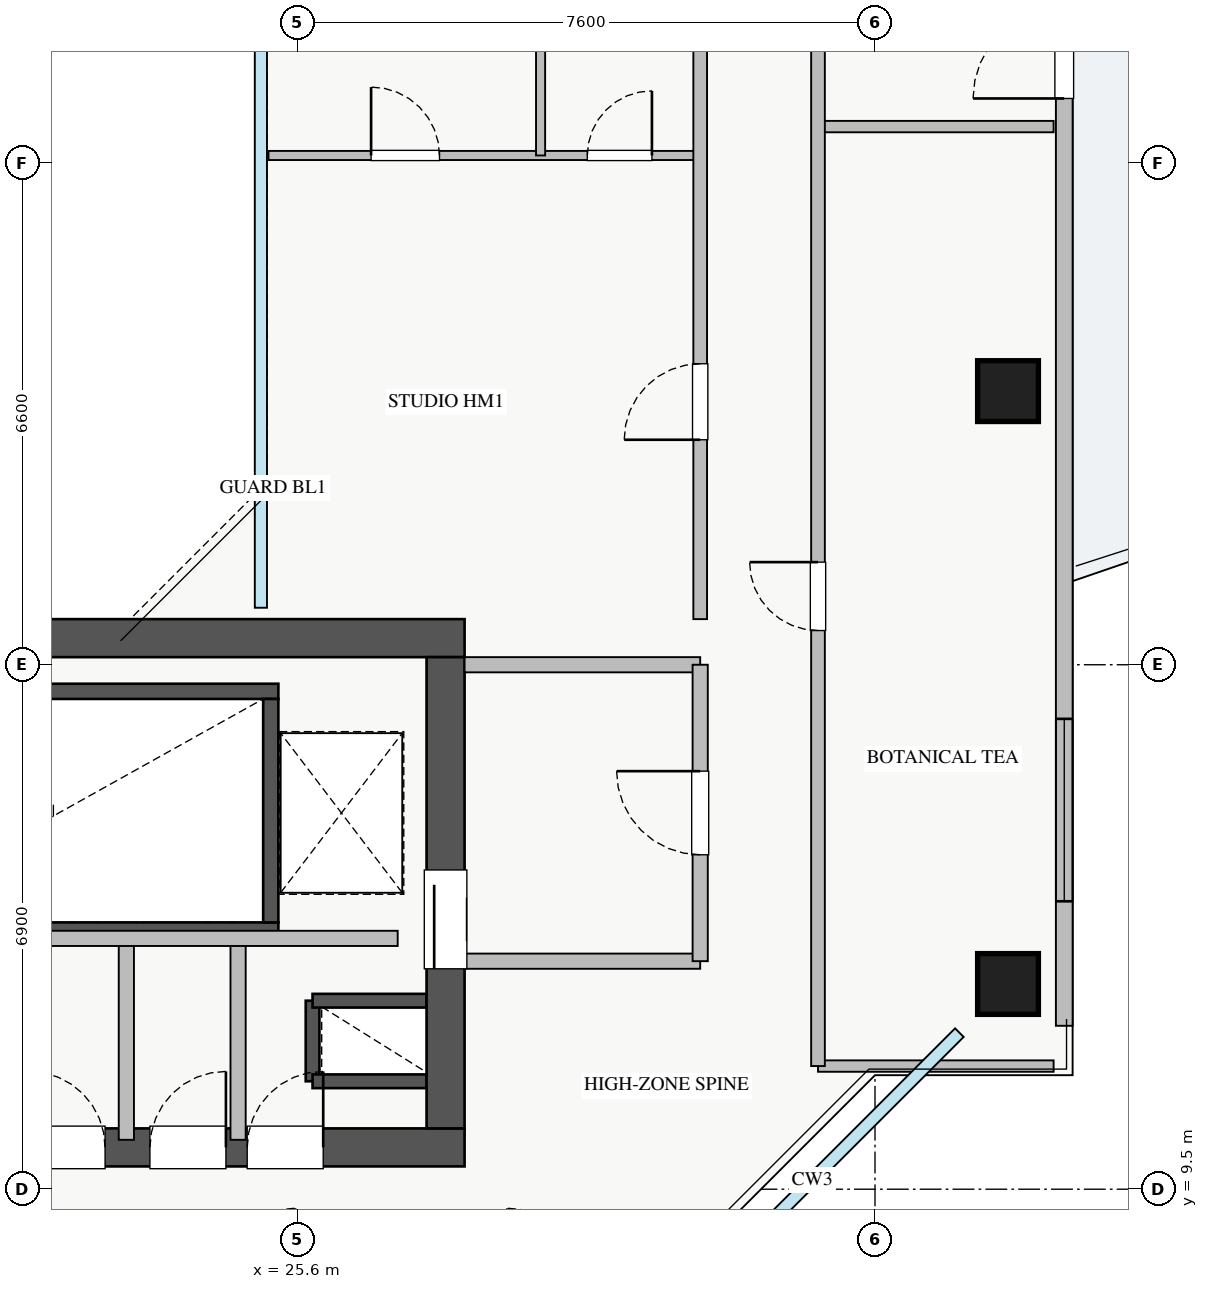
"""IFC4 building model, lengths in metres.
Left out: names, types, materials, properties, quantities, classifications, styles, units other than length and angle.
Written with IfcOpenShell. Run it as: python <this file> out.ifc"""

import sys

from ifc_helpers import new_model, si_unit, direction, frame, frame_2d, origin, origin_2d, place, context, subcontext, project, spatial, rectangle, extrude, source, transform, mapped, element, fill, save


model = new_model("IFC4")
c1 = context("Model", 3, precision=1e-05, world=origin(), true_north=direction((0.0, 1.0)))
c2 = subcontext(c1, "Body", "Model", "MODEL_VIEW")
j1 = project(units=[si_unit("LENGTHUNIT", "METRE"), si_unit("PLANEANGLEUNIT", "RADIAN")], contexts=[c1])
p1 = place(None, origin())
s1 = spatial("IfcSite", under=j1, at=p1, CompositionType="ELEMENT")
p2 = place(p1, origin())
s2 = spatial("IfcBuilding", under=s1, at=p2, CompositionType="ELEMENT")
p3 = place(p2, frame((0.0, 0.0, 193.75)))
s3 = spatial("IfcBuildingStorey", under=s2, at=p3, CompositionType="ELEMENT", Elevation=193.75)
p4 = place(p3, frame((25.8, 10.92, 0.0), z_axis=(0.0, 0.0, 1.0), x_axis=(0.0, 1.0, 0.0)))
e1 = element("IfcWall", 1, at=p4, inside=s3, PredefinedType="SHEAR", context=c2, shape_type="SweptSolid", body=[
    extrude(rectangle(XDim=1.06, YDim=0.18, at=frame_2d((0.53, 0.0))), origin(), (0.0, 0.0, 1.0), 3.07),
])
for number, where, z_axis, x_axis in (
    (2, (25.8, 11.98, 0.0), (0.0, 0.0, 1.0), (1.0, 0.0, 0.0)),
    (3, (25.8, 10.92, 0.0), (0.0, 0.0, 1.0), (1.0, 0.0, 0.0)),
):
    element("IfcWall", number, at=place(p3, frame(where, z_axis=z_axis, x_axis=x_axis)), inside=s3, PredefinedType="SHEAR", context=c2, shape_type="SweptSolid", body=[
        extrude(rectangle(XDim=1.5, YDim=0.18, at=frame_2d((0.75, 0.0))), origin(), (0.0, 0.0, 1.0), 3.07),
    ])
p5 = place(p3, frame((18.2, 12.91, 0.0), z_axis=(0.0, 0.0, 1.0), x_axis=(1.0, 0.0, 0.0)))
e4 = element("IfcWall", 4, at=p5, inside=s3, PredefinedType="SHEAR", context=c2, shape_type="SweptSolid", body=[
    extrude(rectangle(XDim=7.15, YDim=0.2, at=frame_2d((3.575, 0.0))), origin(), (0.0, 0.0, 1.0), 3.25),
])
p6 = place(p5, frame((0.35, 0.0, 0.0)))
e5 = element("IfcOpeningElement", 5, at=p6, cuts=e4, PredefinedType="OPENING", context=c2, shape_type="SweptSolid", body=[
    extrude(rectangle(XDim=1.1, YDim=2.05, at=frame_2d((0.55, 1.025))), frame((0.0, 0.11, 0.0), z_axis=(0.0, -1.0, 0.0), x_axis=(1.0, 0.0, 0.0)), (0.0, 0.0, 1.0), 0.22),
])
p7 = place(p3, frame((18.2, 16.05, 0.0), z_axis=(0.0, 0.0, 1.0), x_axis=(1.0, 0.0, 0.0)))
e6 = element("IfcWall", 6, at=p7, inside=s3, PredefinedType="SHEAR", context=c2, shape_type="SweptSolid", body=[
    extrude(rectangle(XDim=7.15, YDim=0.2, at=frame_2d((3.575, 0.0))), origin(), (0.0, 0.0, 1.0), 3.25),
])
p8 = place(p3, frame((25.25, 13.01, 0.0), z_axis=(0.0, 0.0, 1.0), x_axis=(0.0, 1.0, 0.0)))
e7 = element("IfcWall", 7, at=p8, inside=s3, PredefinedType="SHEAR", context=c2, shape_type="SweptSolid", body=[
    extrude(rectangle(XDim=2.94, YDim=0.2, at=frame_2d((1.47, 0.0))), origin(), (0.0, 0.0, 1.0), 3.25),
])
p9 = place(p3, frame((10.2, 10.05, 0.0), z_axis=(0.0, 0.0, 1.0), x_axis=(1.0, 0.0, 0.0)))
e8 = element("IfcWall", 8, at=p9, inside=s3, PredefinedType="SHEAR", context=c2, shape_type="SweptSolid", body=[
    extrude(rectangle(XDim=17.6, YDim=0.5, at=frame_2d((8.8, 0.0))), origin(), (0.0, 0.0, 1.0), 3.25),
])
p10 = place(p9, frame((1.15, 0.0, 0.0)))
e9 = element("IfcOpeningElement", 9, at=p10, cuts=e8, PredefinedType="OPENING", context=c2, shape_type="SweptSolid", body=[
    extrude(rectangle(XDim=1.1, YDim=2.05, at=frame_2d((0.55, 1.025))), frame((0.0, 0.26, 0.0), z_axis=(0.0, -1.0, 0.0), x_axis=(1.0, 0.0, 0.0)), (0.0, 0.0, 1.0), 0.52),
])
p11 = place(p9, frame((8.3, 0.0, 0.0)))
e10 = element("IfcOpeningElement", 10, at=p11, cuts=e8, PredefinedType="OPENING", context=c2, shape_type="SweptSolid", body=[
    extrude(rectangle(XDim=1.1, YDim=2.05, at=frame_2d((0.55, 1.025))), frame((0.0, 0.26, 0.0), z_axis=(0.0, -1.0, 0.0), x_axis=(1.0, 0.0, 0.0)), (0.0, 0.0, 1.0), 0.52),
])
p12 = place(p9, frame((2.85, 0.0, 0.0)))
e11 = element("IfcOpeningElement", 11, at=p12, cuts=e8, PredefinedType="OPENING", context=c2, shape_type="SweptSolid", body=[
    extrude(rectangle(XDim=1.1, YDim=2.05, at=frame_2d((0.55, 1.025))), frame((0.0, 0.26, 0.0), z_axis=(0.0, -1.0, 0.0), x_axis=(1.0, 0.0, 0.0)), (0.0, 0.0, 1.0), 0.52),
])
p13 = place(p9, frame((5.8, 0.0, 0.0)))
e12 = element("IfcOpeningElement", 12, at=p13, cuts=e8, PredefinedType="OPENING", context=c2, shape_type="SweptSolid", body=[
    extrude(rectangle(XDim=1.0, YDim=2.05, at=frame_2d((0.5, 1.025))), frame((0.0, 0.26, 0.0), z_axis=(0.0, -1.0, 0.0), x_axis=(1.0, 0.0, 0.0)), (0.0, 0.0, 1.0), 0.52),
])
p14 = place(p9, frame((14.74, 0.0, 0.0)))
e13 = element("IfcOpeningElement", 13, at=p14, cuts=e8, PredefinedType="OPENING", context=c2, shape_type="SweptSolid", body=[
    extrude(rectangle(XDim=1.0, YDim=2.05, at=frame_2d((0.5, 1.025))), frame((0.0, 0.26, 0.0), z_axis=(0.0, -1.0, 0.0), x_axis=(1.0, 0.0, 0.0)), (0.0, 0.0, 1.0), 0.52),
])
p15 = place(p9, frame((10.155, 0.0, 0.0)))
e14 = element("IfcOpeningElement", 14, at=p15, cuts=e8, PredefinedType="OPENING", context=c2, shape_type="SweptSolid", body=[
    extrude(rectangle(XDim=1.0, YDim=2.05, at=frame_2d((0.5, 1.025))), frame((0.0, 0.26, 0.0), z_axis=(0.0, -1.0, 0.0), x_axis=(1.0, 0.0, 0.0)), (0.0, 0.0, 1.0), 0.52),
])
p16 = place(p9, frame((11.87, 0.0, 0.0)))
e15 = element("IfcOpeningElement", 15, at=p16, cuts=e8, PredefinedType="OPENING", context=c2, shape_type="SweptSolid", body=[
    extrude(rectangle(XDim=1.0, YDim=2.05, at=frame_2d((0.5, 1.025))), frame((0.0, 0.26, 0.0), z_axis=(0.0, -1.0, 0.0), x_axis=(1.0, 0.0, 0.0)), (0.0, 0.0, 1.0), 0.52),
])
p17 = place(p9, frame((13.46, 0.0, 0.0)))
e16 = element("IfcOpeningElement", 16, at=p17, cuts=e8, PredefinedType="OPENING", context=c2, shape_type="SweptSolid", body=[
    extrude(rectangle(XDim=1.0, YDim=2.05, at=frame_2d((0.5, 1.025))), frame((0.0, 0.26, 0.0), z_axis=(0.0, -1.0, 0.0), x_axis=(1.0, 0.0, 0.0)), (0.0, 0.0, 1.0), 0.52),
])
p18 = place(p3, frame((10.2, 16.75, 0.0), z_axis=(0.0, 0.0, 1.0), x_axis=(1.0, 0.0, 0.0)))
e17 = element("IfcWall", 17, at=p18, inside=s3, PredefinedType="SHEAR", context=c2, shape_type="SweptSolid", body=[
    extrude(rectangle(XDim=17.6, YDim=0.5, at=frame_2d((8.8, 0.0))), origin(), (0.0, 0.0, 1.0), 3.25),
])
p19 = place(p3, frame((27.55, 10.3, 0.0), z_axis=(0.0, 0.0, 1.0), x_axis=(0.0, 1.0, 0.0)))
e18 = element("IfcWall", 18, at=p19, inside=s3, PredefinedType="SHEAR", context=c2, shape_type="SweptSolid", body=[
    extrude(rectangle(XDim=6.2, YDim=0.5, at=frame_2d((3.1, 0.0))), origin(), (0.0, 0.0, 1.0), 3.25),
])
p20 = place(p19, frame((2.1, 0.0, 0.0)))
e19 = element("IfcOpeningElement", 19, at=p20, cuts=e18, PredefinedType="OPENING", context=c2, shape_type="SweptSolid", body=[
    extrude(rectangle(XDim=1.3, YDim=2.05, at=frame_2d((0.65, 1.025))), frame((0.0, 0.26, 0.0), z_axis=(0.0, -1.0, 0.0), x_axis=(1.0, 0.0, 0.0)), (0.0, 0.0, 1.0), 0.52),
])
m1 = source(origin(), c2, "Body", "SweptSolid", [
    extrude(rectangle(XDim=0.8, YDim=0.8, at=origin_2d()), origin(), (0.0, 0.0, 1.0), 3.25),
])
for number, where, z_axis, x_axis in (
    (20, (34.95, 12.2, 0.0), (0.0, 0.0, 1.0), (1.0, 0.0, 0.0)),
    (21, (34.95, 20.0, 0.0), (0.0, 0.0, 1.0), (1.0, 0.0, 0.0)),
):
    element("IfcColumn", number, at=place(p3, frame(where, z_axis=z_axis, x_axis=x_axis)), inside=s3, PredefinedType="COLUMN", context=c2, shape_type="MappedRepresentation", body=[
        mapped(m1, transform((0.0, 0.0, 0.0), x_axis=(1.0, 0.0, 0.0), y_axis=(0.0, 1.0, 0.0), z_axis=(0.0, 0.0, 1.0), scale=1.0)),
    ])
p21 = place(p3, frame((35.69, 11.65, 0.0), z_axis=(0.0, 0.0, 1.0), x_axis=(0.0, 1.0, 0.0)))
e22 = element("IfcWall", 22, at=p21, inside=s3, PredefinedType="STANDARD", context=c2, shape_type="SweptSolid", body=[
    extrude(rectangle(XDim=22.7, YDim=0.22, at=frame_2d((11.35, 0.0))), origin(), (0.0, 0.0, 1.0), 2.61),
])
p22 = place(p21, frame((12.2, 0.0, 0.0)))
e23 = element("IfcOpeningElement", 23, at=p22, cuts=e22, PredefinedType="OPENING", context=c2, shape_type="SweptSolid", body=[
    extrude(rectangle(XDim=1.2, YDim=2.1, at=frame_2d((0.6, 1.05))), frame((0.0, 0.12, 0.0), z_axis=(0.0, -1.0, 0.0), x_axis=(1.0, 0.0, 0.0)), (0.0, 0.0, 1.0), 0.24),
])
p23 = place(p21, frame((1.638, 0.0, 0.9)))
e24 = element("IfcOpeningElement", 24, at=p23, cuts=e22, PredefinedType="OPENING", context=c2, shape_type="SweptSolid", body=[
    extrude(rectangle(XDim=2.4, YDim=1.48, at=frame_2d((1.2, 0.74))), frame((0.0, 0.12, 0.0), z_axis=(0.0, -1.0, 0.0), x_axis=(1.0, 0.0, 0.0)), (0.0, 0.0, 1.0), 0.24),
])
p24 = place(p21, frame((18.813, 0.0, 0.9)))
e25 = element("IfcOpeningElement", 25, at=p24, cuts=e22, PredefinedType="OPENING", context=c2, shape_type="SweptSolid", body=[
    extrude(rectangle(XDim=2.1, YDim=1.48, at=frame_2d((1.05, 0.74))), frame((0.0, 0.12, 0.0), z_axis=(0.0, -1.0, 0.0), x_axis=(1.0, 0.0, 0.0)), (0.0, 0.0, 1.0), 0.24),
])
p25 = place(p3, frame((27.8, 16.4, 0.0), z_axis=(0.0, 0.0, 1.0), x_axis=(1.0, 0.0, 0.0)))
e26 = element("IfcWall", 26, at=p25, inside=s3, PredefinedType="PARTITIONING", context=c2, shape_type="SweptSolid", body=[
    extrude(rectangle(XDim=3.1, YDim=0.2, at=frame_2d((1.55, 0.0))), origin(), (0.0, 0.0, 1.0), 3.07),
])
p26 = place(p3, frame((27.8, 12.5, 0.0), z_axis=(0.0, 0.0, 1.0), x_axis=(1.0, 0.0, 0.0)))
e27 = element("IfcWall", 27, at=p26, inside=s3, PredefinedType="PARTITIONING", context=c2, shape_type="SweptSolid", body=[
    extrude(rectangle(XDim=3.1, YDim=0.2, at=frame_2d((1.55, 0.0))), origin(), (0.0, 0.0, 1.0), 2.265),
])
p27 = place(p3, frame((30.9, 12.5, 0.0), z_axis=(0.0, 0.0, 1.0), x_axis=(0.0, 1.0, 0.0)))
e28 = element("IfcWall", 28, at=p27, inside=s3, PredefinedType="PARTITIONING", context=c2, shape_type="SweptSolid", body=[
    extrude(rectangle(XDim=3.9, YDim=0.2, at=frame_2d((1.95, 0.0))), origin(), (0.0, 0.0, 1.0), 3.07),
])
p28 = place(p27, frame((1.4, 0.0, 0.0)))
e29 = element("IfcOpeningElement", 29, at=p28, cuts=e28, PredefinedType="OPENING", context=c2, shape_type="SweptSolid", body=[
    extrude(rectangle(XDim=1.1, YDim=2.05, at=frame_2d((0.55, 1.025))), frame((0.0, 0.11, 0.0), z_axis=(0.0, -1.0, 0.0), x_axis=(1.0, 0.0, 0.0)), (0.0, 0.0, 1.0), 0.22),
])
for number, where, z_axis, x_axis in (
    (30, (24.82, 10.15, 0.0), (0.0, 0.0, 1.0), (0.0, 1.0, 0.0)),
    (31, (23.35, 10.15, 0.0), (0.0, 0.0, 1.0), (0.0, 1.0, 0.0)),
):
    element("IfcWall", number, at=place(p3, frame(where, z_axis=z_axis, x_axis=x_axis)), inside=s3, PredefinedType="PARTITIONING", context=c2, shape_type="SweptSolid", body=[
        extrude(rectangle(XDim=2.65, YDim=0.2, at=frame_2d((1.325, 0.0))), origin(), (0.0, 0.0, 1.0), 3.07),
    ])
p29 = place(p3, frame((21.75, 12.8, 0.0), z_axis=(0.0, 0.0, 1.0), x_axis=(1.0, 0.0, 0.0)))
e32 = element("IfcWall", 32, at=p29, inside=s3, PredefinedType="PARTITIONING", context=c2, shape_type="SweptSolid", body=[
    extrude(rectangle(XDim=5.17, YDim=0.2, at=frame_2d((2.585, 0.0))), origin(), (0.0, 0.0, 1.0), 3.07),
])
p30 = place(p3, frame((25.22, 23.1, 0.0), z_axis=(0.0, 0.0, 1.0), x_axis=(1.0, 0.0, 0.0)))
e33 = element("IfcWall", 33, at=p30, inside=s3, PredefinedType="PLUMBINGWALL", context=c2, shape_type="SweptSolid", body=[
    extrude(rectangle(XDim=5.68, YDim=0.12, at=frame_2d((2.84, 0.0))), origin(), (0.0, 0.0, 1.0), 3.07),
])
p31 = place(p30, frame((1.35, 0.0, 0.0)))
e34 = element("IfcOpeningElement", 34, at=p31, cuts=e33, PredefinedType="OPENING", context=c2, shape_type="SweptSolid", body=[
    extrude(rectangle(XDim=0.9, YDim=2.05, at=frame_2d((0.45, 1.025))), frame((0.0, 0.07, 0.0), z_axis=(0.0, -1.0, 0.0), x_axis=(1.0, 0.0, 0.0)), (0.0, 0.0, 1.0), 0.14),
])
p32 = place(p30, frame((4.195, 0.0, 0.0)))
e35 = element("IfcOpeningElement", 35, at=p32, cuts=e33, PredefinedType="OPENING", context=c2, shape_type="SweptSolid", body=[
    extrude(rectangle(XDim=0.85, YDim=2.05, at=frame_2d((0.425, 1.025))), frame((0.0, 0.07, 0.0), z_axis=(0.0, -1.0, 0.0), x_axis=(1.0, 0.0, 0.0)), (0.0, 0.0, 1.0), 0.14),
])
p33 = place(p3, frame((28.8, 23.1, 0.0), z_axis=(0.0, 0.0, 1.0), x_axis=(0.0, 1.0, 0.0)))
e36 = element("IfcWall", 36, at=p33, inside=s3, PredefinedType="PLUMBINGWALL", context=c2, shape_type="SweptSolid", body=[
    extrude(rectangle(XDim=5.9, YDim=0.12, at=frame_2d((2.95, 0.0))), origin(), (0.0, 0.0, 1.0), 3.07),
])
p34 = place(p3, frame((30.9, 17.0, 0.0), z_axis=(0.0, 0.0, 1.0), x_axis=(0.0, 1.0, 0.0)))
e37 = element("IfcWall", 37, at=p34, inside=s3, PredefinedType="PARTITIONING", context=c2, shape_type="SweptSolid", body=[
    extrude(rectangle(XDim=12.0, YDim=0.18, at=frame_2d((6.0, 0.0))), origin(), (0.0, 0.0, 1.0), 3.07),
])
p35 = place(p34, frame((2.36, 0.0, 0.0)))
e38 = element("IfcOpeningElement", 38, at=p35, cuts=e37, PredefinedType="OPENING", context=c2, shape_type="SweptSolid", body=[
    extrude(rectangle(XDim=1.0, YDim=2.05, at=frame_2d((0.5, 1.025))), frame((0.0, 0.1, 0.0), z_axis=(0.0, -1.0, 0.0), x_axis=(1.0, 0.0, 0.0)), (0.0, 0.0, 1.0), 0.2),
])
for number, where, z_axis, x_axis in (
    (39, (32.45, 11.12, 0.0), (0.0, 0.0, 1.0), (1.0, 0.0, 0.0)),
    (40, (32.45, 23.48, 0.0), (0.0, 0.0, 1.0), (1.0, 0.0, 0.0)),
):
    element("IfcWall", number, at=place(p3, frame(where, z_axis=z_axis, x_axis=x_axis)), inside=s3, PredefinedType="PARTITIONING", context=c2, shape_type="SweptSolid", body=[
        extrude(rectangle(XDim=3.1, YDim=0.15, at=frame_2d((1.55, 0.0))), origin(), (0.0, 0.0, 1.0), 3.07),
    ])
p36 = place(p3, frame((32.45, 11.12, 0.0), z_axis=(0.0, 0.0, 1.0), x_axis=(0.0, 1.0, 0.0)))
e41 = element("IfcWall", 41, at=p36, inside=s3, PredefinedType="PARTITIONING", context=c2, shape_type="SweptSolid", body=[
    extrude(rectangle(XDim=23.76, YDim=0.18, at=frame_2d((11.88, 0.0))), origin(), (0.0, 0.0, 1.0), 3.07),
])
p37 = place(p36, frame((5.73, 0.0, 0.0)))
e42 = element("IfcOpeningElement", 42, at=p37, cuts=e41, PredefinedType="OPENING", context=c2, shape_type="SweptSolid", body=[
    extrude(rectangle(XDim=0.9, YDim=2.05, at=frame_2d((0.45, 1.025))), frame((0.0, 0.1, 0.0), z_axis=(0.0, -1.0, 0.0), x_axis=(1.0, 0.0, 0.0)), (0.0, 0.0, 1.0), 0.2),
])
p38 = place(p36, frame((17.61, 0.0, 0.0)))
e43 = element("IfcOpeningElement", 43, at=p38, cuts=e41, PredefinedType="OPENING", context=c2, shape_type="SweptSolid", body=[
    extrude(rectangle(XDim=0.9, YDim=2.05, at=frame_2d((0.45, 1.025))), frame((0.0, 0.1, 0.0), z_axis=(0.0, -1.0, 0.0), x_axis=(1.0, 0.0, 0.0)), (0.0, 0.0, 1.0), 0.2),
])
m2 = source(origin(), c2, "Body", "SweptSolid", [
    extrude(rectangle(XDim=1.2, YDim=2.1, at=frame_2d((0.6, 1.05))), frame((0.0, 0.025, 0.0), z_axis=(0.0, -1.0, 0.0), x_axis=(1.0, 0.0, 0.0)), (0.0, 0.0, 1.0), 0.05),
])
p39 = place(p22, origin())
e44 = element("IfcDoor", 44, at=p39, inside=s3, OperationType="SINGLE_SWING_LEFT", PredefinedType="DOOR", context=c2, shape_type="MappedRepresentation", body=[
    mapped(m2, transform((0.0, 0.0, 0.0), x_axis=(1.0, 0.0, 0.0), y_axis=(0.0, 1.0, 0.0), z_axis=(0.0, 0.0, 1.0), scale=1.0)),
])
fill(e23, e44)
m3 = source(origin(), c2, "Body", "SweptSolid", [
    extrude(rectangle(XDim=2.4, YDim=1.48, at=frame_2d((1.2, 0.74))), frame((0.0, 0.03, 0.0), z_axis=(0.0, -1.0, 0.0), x_axis=(1.0, 0.0, 0.0)), (0.0, 0.0, 1.0), 0.06),
])
p40 = place(p23, origin())
e45 = element("IfcWindow", 45, at=p40, inside=s3, PartitioningType="TRIPLE_PANEL_VERTICAL", PredefinedType="WINDOW", context=c2, shape_type="MappedRepresentation", body=[
    mapped(m3, transform((0.0, 0.0, 0.0), x_axis=(1.0, 0.0, 0.0), y_axis=(0.0, 1.0, 0.0), z_axis=(0.0, 0.0, 1.0), scale=1.0)),
])
fill(e24, e45)
m4 = source(origin(), c2, "Body", "SweptSolid", [
    extrude(rectangle(XDim=1.3, YDim=2.05, at=frame_2d((0.65, 1.025))), frame((0.0, 0.025, 0.0), z_axis=(0.0, -1.0, 0.0), x_axis=(1.0, 0.0, 0.0)), (0.0, 0.0, 1.0), 0.05),
])
p41 = place(p20, origin())
e46 = element("IfcDoor", 46, at=p41, inside=s3, OperationType="SLIDING_TO_RIGHT", PredefinedType="DOOR", context=c2, shape_type="MappedRepresentation", body=[
    mapped(m4, transform((0.0, 0.0, 0.0), x_axis=(1.0, 0.0, 0.0), y_axis=(0.0, 1.0, 0.0), z_axis=(0.0, 0.0, 1.0), scale=1.0)),
])
fill(e19, e46)
m5 = source(origin(), c2, "Body", "SweptSolid", [
    extrude(rectangle(XDim=1.0, YDim=2.05, at=frame_2d((0.5, 1.025))), frame((0.0, 0.025, 0.0), z_axis=(0.0, -1.0, 0.0), x_axis=(1.0, 0.0, 0.0)), (0.0, 0.0, 1.0), 0.05),
])
p42 = place(p14, origin())
e47 = element("IfcDoor", 47, at=p42, inside=s3, OperationType="SINGLE_SWING_RIGHT", PredefinedType="DOOR", context=c2, shape_type="MappedRepresentation", body=[
    mapped(m5, transform((0.0, 0.0, 0.0), x_axis=(1.0, 0.0, 0.0), y_axis=(0.0, 1.0, 0.0), z_axis=(0.0, 0.0, 1.0), scale=1.0)),
])
fill(e13, e47)
p43 = place(p16, origin())
e48 = element("IfcDoor", 48, at=p43, inside=s3, OperationType="SINGLE_SWING_LEFT", PredefinedType="DOOR", context=c2, shape_type="MappedRepresentation", body=[
    mapped(m5, transform((0.0, 0.0, 0.0), x_axis=(1.0, 0.0, 0.0), y_axis=(0.0, 1.0, 0.0), z_axis=(0.0, 0.0, 1.0), scale=1.0)),
])
fill(e15, e48)
p44 = place(p17, origin())
e49 = element("IfcDoor", 49, at=p44, inside=s3, OperationType="SINGLE_SWING_RIGHT", PredefinedType="DOOR", context=c2, shape_type="MappedRepresentation", body=[
    mapped(m5, transform((0.0, 0.0, 0.0), x_axis=(1.0, 0.0, 0.0), y_axis=(0.0, 1.0, 0.0), z_axis=(0.0, 0.0, 1.0), scale=1.0)),
])
fill(e16, e49)
m6 = source(origin(), c2, "Body", "SweptSolid", [
    extrude(rectangle(XDim=1.1, YDim=2.05, at=frame_2d((0.55, 1.025))), frame((0.0, 0.025, 0.0), z_axis=(0.0, -1.0, 0.0), x_axis=(1.0, 0.0, 0.0)), (0.0, 0.0, 1.0), 0.05),
])
p45 = place(p28, origin())
e50 = element("IfcDoor", 50, at=p45, inside=s3, OperationType="SINGLE_SWING_RIGHT", PredefinedType="DOOR", context=c2, shape_type="MappedRepresentation", body=[
    mapped(m6, transform((0.0, 0.0, 0.0), x_axis=(1.0, 0.0, 0.0), y_axis=(0.0, 1.0, 0.0), z_axis=(0.0, 0.0, 1.0), scale=1.0)),
])
fill(e29, e50)
m7 = source(origin(), c2, "Body", "SweptSolid", [
    extrude(rectangle(XDim=0.9, YDim=2.05, at=frame_2d((0.45, 1.025))), frame((0.0, 0.025, 0.0), z_axis=(0.0, -1.0, 0.0), x_axis=(1.0, 0.0, 0.0)), (0.0, 0.0, 1.0), 0.05),
])
p46 = place(p31, origin())
e51 = element("IfcDoor", 51, at=p46, inside=s3, OperationType="SINGLE_SWING_LEFT", PredefinedType="DOOR", context=c2, shape_type="MappedRepresentation", body=[
    mapped(m7, transform((0.0, 0.0, 0.0), x_axis=(1.0, 0.0, 0.0), y_axis=(0.0, 1.0, 0.0), z_axis=(0.0, 0.0, 1.0), scale=1.0)),
])
fill(e34, e51)
m8 = source(origin(), c2, "Body", "SweptSolid", [
    extrude(rectangle(XDim=0.85, YDim=2.05, at=frame_2d((0.425, 1.025))), frame((0.0, 0.025, 0.0), z_axis=(0.0, -1.0, 0.0), x_axis=(1.0, 0.0, 0.0)), (0.0, 0.0, 1.0), 0.05),
])
p47 = place(p32, origin())
e52 = element("IfcDoor", 52, at=p47, inside=s3, OperationType="SINGLE_SWING_RIGHT", PredefinedType="DOOR", context=c2, shape_type="MappedRepresentation", body=[
    mapped(m8, transform((0.0, 0.0, 0.0), x_axis=(1.0, 0.0, 0.0), y_axis=(0.0, 1.0, 0.0), z_axis=(0.0, 0.0, 1.0), scale=1.0)),
])
fill(e35, e52)
p48 = place(p35, origin())
e53 = element("IfcDoor", 53, at=p48, inside=s3, OperationType="SINGLE_SWING_LEFT", PredefinedType="DOOR", context=c2, shape_type="MappedRepresentation", body=[
    mapped(m5, transform((0.0, 0.0, 0.0), x_axis=(1.0, 0.0, 0.0), y_axis=(0.0, 1.0, 0.0), z_axis=(0.0, 0.0, 1.0), scale=1.0)),
])
fill(e38, e53)
p49 = place(p37, origin())
e54 = element("IfcDoor", 54, at=p49, inside=s3, OperationType="SINGLE_SWING_RIGHT", PredefinedType="DOOR", context=c2, shape_type="MappedRepresentation", body=[
    mapped(m7, transform((0.0, 0.0, 0.0), x_axis=(1.0, 0.0, 0.0), y_axis=(0.0, 1.0, 0.0), z_axis=(0.0, 0.0, 1.0), scale=1.0)),
])
fill(e42, e54)
save(model, sys.argv[1])
